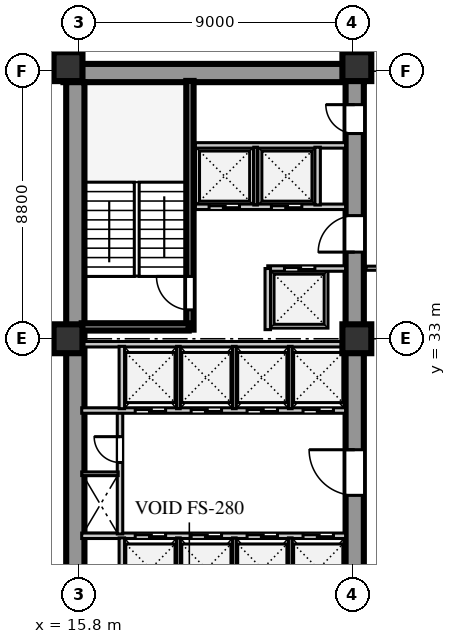
"""IFC4 building model, lengths in metres.
Left out: names, types, materials, properties, quantities, classifications, styles, units other than length and angle.
Written with IfcOpenShell. Run it as: python <this file> out.ifc"""

import sys

from ifc_helpers import new_model, si_unit, direction, frame, frame_2d, origin, origin_2d, place, context, subcontext, project, spatial, rectangle, extrude, element, fill, save


model = new_model("IFC4")
c1 = context("Model", 3, precision=1e-05, world=origin(), true_north=direction((0.0, 1.0)))
c2 = subcontext(c1, "Body", "Model", "MODEL_VIEW")
j1 = project(units=[si_unit("LENGTHUNIT", "METRE"), si_unit("PLANEANGLEUNIT", "RADIAN")], contexts=[c1])
p1 = place(None, origin())
s1 = spatial("IfcSite", under=j1, at=p1, CompositionType="ELEMENT")
p2 = place(p1, origin())
s2 = spatial("IfcBuilding", under=s1, at=p2, CompositionType="ELEMENT")
p3 = place(p2, frame((0.0, 0.0, 42.0)))
s3 = spatial("IfcBuildingStorey", under=s2, at=p3, CompositionType="ELEMENT", Elevation=42.0)
p4 = place(p3, frame((15.3, 41.74, 0.0), z_axis=(0.0, 0.0, 1.0), x_axis=(1.0, 0.0, 0.0)))
e1 = element("IfcWall", 1, at=p4, inside=s3, PredefinedType="SHEAR", context=c2, shape_type="SweptSolid", body=[
    extrude(rectangle(XDim=9.88, YDim=0.6, at=frame_2d((4.94, 0.0))), origin(), (0.0, 0.0, 1.0), 3.72),
])
p5 = place(p3, frame((15.69, 15.81, 0.0), z_axis=(0.0, 0.0, 1.0), x_axis=(0.0, 1.0, 0.0)))
e2 = element("IfcWall", 2, at=p5, inside=s3, PredefinedType="SHEAR", context=c2, shape_type="SweptSolid", body=[
    extrude(rectangle(XDim=25.63, YDim=0.6, at=frame_2d((12.815, 0.0))), origin(), (0.0, 0.0, 1.0), 3.72),
])
p6 = place(p3, frame((24.88, 15.74, 0.0), z_axis=(0.0, 0.0, 1.0), x_axis=(0.0, 1.0, 0.0)))
e3 = element("IfcWall", 3, at=p6, inside=s3, PredefinedType="SHEAR", context=c2, shape_type="SweptSolid", body=[
    extrude(rectangle(XDim=25.76, YDim=0.6, at=frame_2d((12.88, 0.0))), origin(), (0.0, 0.0, 1.0), 3.72),
])
p7 = place(p6, frame((1.61, 0.0, 0.0)))
e4 = element("IfcOpeningElement", 4, at=p7, cuts=e3, PredefinedType="OPENING", context=c2, shape_type="SweptSolid", body=[
    extrude(rectangle(XDim=1.2, YDim=2.1, at=frame_2d((0.6, 1.05))), frame((0.0, 0.31, 0.0), z_axis=(0.0, -1.0, 0.0), x_axis=(1.0, 0.0, 0.0)), (0.0, 0.0, 1.0), 0.62),
])
p8 = place(p6, frame((6.78, 0.0, 0.0)))
e5 = element("IfcOpeningElement", 5, at=p8, cuts=e3, PredefinedType="OPENING", context=c2, shape_type="SweptSolid", body=[
    extrude(rectangle(XDim=0.85, YDim=2.06, at=frame_2d((0.425, 1.03))), frame((0.0, 0.31, 0.0), z_axis=(0.0, -1.0, 0.0), x_axis=(1.0, 0.0, 0.0)), (0.0, 0.0, 1.0), 0.62),
])
p9 = place(p6, frame((12.11, 0.0, 0.0)))
e6 = element("IfcOpeningElement", 6, at=p9, cuts=e3, PredefinedType="OPENING", context=c2, shape_type="SweptSolid", body=[
    extrude(rectangle(XDim=1.5, YDim=2.12, at=frame_2d((0.75, 1.06))), frame((0.0, 0.31, 0.0), z_axis=(0.0, -1.0, 0.0), x_axis=(1.0, 0.0, 0.0)), (0.0, 0.0, 1.0), 0.62),
])
p10 = place(p6, frame((20.11, 0.0, 0.0)))
e7 = element("IfcOpeningElement", 7, at=p10, cuts=e3, PredefinedType="OPENING", context=c2, shape_type="SweptSolid", body=[
    extrude(rectangle(XDim=1.2, YDim=2.12, at=frame_2d((0.6, 1.06))), frame((0.0, 0.31, 0.0), z_axis=(0.0, -1.0, 0.0), x_axis=(1.0, 0.0, 0.0)), (0.0, 0.0, 1.0), 0.62),
])
p11 = place(p6, frame((24.01, 0.0, 0.0)))
e8 = element("IfcOpeningElement", 8, at=p11, cuts=e3, PredefinedType="OPENING", context=c2, shape_type="SweptSolid", body=[
    extrude(rectangle(XDim=0.95, YDim=2.1, at=frame_2d((0.475, 1.05))), frame((0.0, 0.31, 0.0), z_axis=(0.0, -1.0, 0.0), x_axis=(1.0, 0.0, 0.0)), (0.0, 0.0, 1.0), 0.62),
])
for number, where, z_axis, x_axis in (
    (9, (15.45, 33.0, 0.0), (0.0, 0.0, 1.0), (1.0, 0.0, 0.0)),
    (10, (15.45, 41.95, 0.0), (0.0, 0.0, 1.0), (1.0, 0.0, 0.0)),
    (11, (24.95, 33.0, 0.0), (0.0, 0.0, 1.0), (1.0, 0.0, 0.0)),
    (12, (24.95, 41.95, 0.0), (0.0, 0.0, 1.0), (1.0, 0.0, 0.0)),
):
    element("IfcColumn", number, at=place(p3, frame(where, z_axis=z_axis, x_axis=x_axis)), inside=s3, PredefinedType="COLUMN", context=c2, shape_type="SweptSolid", body=[
        extrude(rectangle(XDim=0.95, YDim=0.95, at=origin_2d()), origin(), (0.0, 0.0, 1.0), 3.72),
    ])
p12 = place(p3, frame((15.9, 26.52, 0.0), z_axis=(0.0, 0.0, 1.0), x_axis=(1.0, 0.0, 0.0)))
e13 = element("IfcWall", 13, at=p12, inside=s3, PredefinedType="SOLIDWALL", context=c2, shape_type="SweptSolid", body=[
    extrude(rectangle(XDim=8.68, YDim=0.18, at=frame_2d((4.34, 0.0))), origin(), (0.0, 0.0, 1.0), 3.72),
])
p13 = place(p12, frame((1.76, 0.0, 0.0)))
e14 = element("IfcOpeningElement", 14, at=p13, cuts=e13, PredefinedType="OPENING", context=c2, shape_type="SweptSolid", body=[
    extrude(rectangle(XDim=1.0, YDim=2.1, at=frame_2d((0.5, 1.05))), frame((0.0, 0.1, 0.0), z_axis=(0.0, -1.0, 0.0), x_axis=(1.0, 0.0, 0.0)), (0.0, 0.0, 1.0), 0.2),
])
p14 = place(p12, frame((3.6, 0.0, 0.0)))
e15 = element("IfcOpeningElement", 15, at=p14, cuts=e13, PredefinedType="OPENING", context=c2, shape_type="SweptSolid", body=[
    extrude(rectangle(XDim=1.0, YDim=2.1, at=frame_2d((0.5, 1.05))), frame((0.0, 0.1, 0.0), z_axis=(0.0, -1.0, 0.0), x_axis=(1.0, 0.0, 0.0)), (0.0, 0.0, 1.0), 0.2),
])
p15 = place(p12, frame((5.44, 0.0, 0.0)))
e16 = element("IfcOpeningElement", 16, at=p15, cuts=e13, PredefinedType="OPENING", context=c2, shape_type="SweptSolid", body=[
    extrude(rectangle(XDim=1.0, YDim=2.1, at=frame_2d((0.5, 1.05))), frame((0.0, 0.1, 0.0), z_axis=(0.0, -1.0, 0.0), x_axis=(1.0, 0.0, 0.0)), (0.0, 0.0, 1.0), 0.2),
])
p16 = place(p12, frame((7.28, 0.0, 0.0)))
e17 = element("IfcOpeningElement", 17, at=p16, cuts=e13, PredefinedType="OPENING", context=c2, shape_type="SweptSolid", body=[
    extrude(rectangle(XDim=1.0, YDim=2.1, at=frame_2d((0.5, 1.05))), frame((0.0, 0.1, 0.0), z_axis=(0.0, -1.0, 0.0), x_axis=(1.0, 0.0, 0.0)), (0.0, 0.0, 1.0), 0.2),
])
p17 = place(p3, frame((17.22, 24.4, 0.0), z_axis=(0.0, 0.0, 1.0), x_axis=(0.0, 1.0, 0.0)))
e18 = element("IfcWall", 18, at=p17, inside=s3, PredefinedType="SOLIDWALL", context=c2, shape_type="SweptSolid", body=[
    extrude(rectangle(XDim=2.05, YDim=0.18, at=frame_2d((1.025, 0.0))), origin(), (0.0, 0.0, 1.0), 3.72),
])
for number, where, z_axis, x_axis in (
    (19, (19.08, 24.4, 0.0), (0.0, 0.0, 1.0), (0.0, 1.0, 0.0)),
    (20, (20.92, 24.4, 0.0), (0.0, 0.0, 1.0), (0.0, 1.0, 0.0)),
    (21, (22.76, 24.4, 0.0), (0.0, 0.0, 1.0), (0.0, 1.0, 0.0)),
):
    element("IfcWall", number, at=place(p3, frame(where, z_axis=z_axis, x_axis=x_axis)), inside=s3, PredefinedType="PARTITIONING", context=c2, shape_type="SweptSolid", body=[
        extrude(rectangle(XDim=2.05, YDim=0.12, at=frame_2d((1.025, 0.0))), origin(), (0.0, 0.0, 1.0), 3.72),
    ])
p18 = place(p3, frame((17.16, 26.58, 0.0), z_axis=(0.0, 0.0, 1.0), x_axis=(0.0, 1.0, 0.0)))
e22 = element("IfcWall", 22, at=p18, inside=s3, PredefinedType="SOLIDWALL", context=c2, shape_type="SweptSolid", body=[
    extrude(rectangle(XDim=4.02, YDim=0.18, at=frame_2d((2.01, 0.0))), origin(), (0.0, 0.0, 1.0), 3.72),
])
p19 = place(p18, frame((2.35, 0.0, 0.0)))
e23 = element("IfcOpeningElement", 23, at=p19, cuts=e22, PredefinedType="OPENING", context=c2, shape_type="SweptSolid", body=[
    extrude(rectangle(XDim=0.85, YDim=2.06, at=frame_2d((0.425, 1.03))), frame((0.0, 0.1, 0.0), z_axis=(0.0, -1.0, 0.0), x_axis=(1.0, 0.0, 0.0)), (0.0, 0.0, 1.0), 0.2),
])
p20 = place(p3, frame((15.9, 28.56, 0.0), z_axis=(0.0, 0.0, 1.0), x_axis=(1.0, 0.0, 0.0)))
e24 = element("IfcWall", 24, at=p20, inside=s3, PredefinedType="PARTITIONING", context=c2, shape_type="SweptSolid", body=[
    extrude(rectangle(XDim=1.2, YDim=0.12, at=frame_2d((0.6, 0.0))), origin(), (0.0, 0.0, 1.0), 3.72),
])
p21 = place(p3, frame((15.9, 30.64, 0.0), z_axis=(0.0, 0.0, 1.0), x_axis=(1.0, 0.0, 0.0)))
e25 = element("IfcWall", 25, at=p21, inside=s3, PredefinedType="SOLIDWALL", context=c2, shape_type="SweptSolid", body=[
    extrude(rectangle(XDim=8.68, YDim=0.18, at=frame_2d((4.34, 0.0))), origin(), (0.0, 0.0, 1.0), 3.72),
])
p22 = place(p21, frame((1.76, 0.0, 0.0)))
e26 = element("IfcOpeningElement", 26, at=p22, cuts=e25, PredefinedType="OPENING", context=c2, shape_type="SweptSolid", body=[
    extrude(rectangle(XDim=1.0, YDim=2.1, at=frame_2d((0.5, 1.05))), frame((0.0, 0.1, 0.0), z_axis=(0.0, -1.0, 0.0), x_axis=(1.0, 0.0, 0.0)), (0.0, 0.0, 1.0), 0.2),
])
p23 = place(p21, frame((3.6, 0.0, 0.0)))
e27 = element("IfcOpeningElement", 27, at=p23, cuts=e25, PredefinedType="OPENING", context=c2, shape_type="SweptSolid", body=[
    extrude(rectangle(XDim=1.0, YDim=2.1, at=frame_2d((0.5, 1.05))), frame((0.0, 0.1, 0.0), z_axis=(0.0, -1.0, 0.0), x_axis=(1.0, 0.0, 0.0)), (0.0, 0.0, 1.0), 0.2),
])
p24 = place(p21, frame((5.44, 0.0, 0.0)))
e28 = element("IfcOpeningElement", 28, at=p24, cuts=e25, PredefinedType="OPENING", context=c2, shape_type="SweptSolid", body=[
    extrude(rectangle(XDim=1.0, YDim=2.1, at=frame_2d((0.5, 1.05))), frame((0.0, 0.1, 0.0), z_axis=(0.0, -1.0, 0.0), x_axis=(1.0, 0.0, 0.0)), (0.0, 0.0, 1.0), 0.2),
])
p25 = place(p21, frame((7.28, 0.0, 0.0)))
e29 = element("IfcOpeningElement", 29, at=p25, cuts=e25, PredefinedType="OPENING", context=c2, shape_type="SweptSolid", body=[
    extrude(rectangle(XDim=1.0, YDim=2.1, at=frame_2d((0.5, 1.05))), frame((0.0, 0.1, 0.0), z_axis=(0.0, -1.0, 0.0), x_axis=(1.0, 0.0, 0.0)), (0.0, 0.0, 1.0), 0.2),
])
p26 = place(p3, frame((15.9, 32.82, 0.0), z_axis=(0.0, 0.0, 1.0), x_axis=(1.0, 0.0, 0.0)))
e30 = element("IfcWall", 30, at=p26, inside=s3, PredefinedType="SOLIDWALL", context=c2, shape_type="SweptSolid", body=[
    extrude(rectangle(XDim=8.68, YDim=0.18, at=frame_2d((4.34, 0.0))), origin(), (0.0, 0.0, 1.0), 3.02),
])
p27 = place(p3, frame((17.22, 30.7, 0.0), z_axis=(0.0, 0.0, 1.0), x_axis=(0.0, 1.0, 0.0)))
e31 = element("IfcWall", 31, at=p27, inside=s3, PredefinedType="SOLIDWALL", context=c2, shape_type="SweptSolid", body=[
    extrude(rectangle(XDim=2.05, YDim=0.18, at=frame_2d((1.025, 0.0))), origin(), (0.0, 0.0, 1.0), 3.72),
])
for number, where, z_axis, x_axis in (
    (32, (19.08, 30.7, 0.0), (0.0, 0.0, 1.0), (0.0, 1.0, 0.0)),
    (33, (20.92, 30.7, 0.0), (0.0, 0.0, 1.0), (0.0, 1.0, 0.0)),
    (34, (22.76, 30.7, 0.0), (0.0, 0.0, 1.0), (0.0, 1.0, 0.0)),
):
    element("IfcWall", number, at=place(p3, frame(where, z_axis=z_axis, x_axis=x_axis)), inside=s3, PredefinedType="PARTITIONING", context=c2, shape_type="SweptSolid", body=[
        extrude(rectangle(XDim=2.05, YDim=0.12, at=frame_2d((1.025, 0.0))), origin(), (0.0, 0.0, 1.0), 3.72),
    ])
p28 = place(p3, frame((19.46, 33.3, 0.0), z_axis=(0.0, 0.0, 1.0), x_axis=(0.0, 1.0, 0.0)))
e35 = element("IfcWall", 35, at=p28, inside=s3, PredefinedType="SHEAR", context=c2, shape_type="SweptSolid", body=[
    extrude(rectangle(XDim=8.18, YDim=0.24, at=frame_2d((4.09, 0.0))), origin(), (0.0, 0.0, 1.0), 4.0),
])
p29 = place(p28, frame((0.65, 0.0, 0.0)))
e36 = element("IfcOpeningElement", 36, at=p29, cuts=e35, PredefinedType="OPENING", context=c2, shape_type="SweptSolid", body=[
    extrude(rectangle(XDim=1.1, YDim=2.1, at=frame_2d((0.55, 1.05))), frame((0.0, 0.13, 0.0), z_axis=(0.0, -1.0, 0.0), x_axis=(1.0, 0.0, 0.0)), (0.0, 0.0, 1.0), 0.26),
])
p30 = place(p3, frame((15.9, 33.39, 0.0), z_axis=(0.0, 0.0, 1.0), x_axis=(1.0, 0.0, 0.0)))
e37 = element("IfcWall", 37, at=p30, inside=s3, PredefinedType="SHEAR", context=c2, shape_type="SweptSolid", body=[
    extrude(rectangle(XDim=3.52, YDim=0.24, at=frame_2d((1.76, 0.0))), origin(), (0.0, 0.0, 1.0), 4.0),
])
p31 = place(p3, frame((22.02, 35.31, 0.0), z_axis=(0.0, 0.0, 1.0), x_axis=(1.0, 0.0, 0.0)))
e38 = element("IfcWall", 38, at=p31, inside=s3, PredefinedType="SOLIDWALL", context=c2, shape_type="SweptSolid", body=[
    extrude(rectangle(XDim=2.56, YDim=0.18, at=frame_2d((1.28, 0.0))), origin(), (0.0, 0.0, 1.0), 3.72),
])
p32 = place(p31, frame((0.55, 0.0, 0.0)))
e39 = element("IfcOpeningElement", 39, at=p32, cuts=e38, PredefinedType="OPENING", context=c2, shape_type="SweptSolid", body=[
    extrude(rectangle(XDim=1.0, YDim=2.1, at=frame_2d((0.5, 1.05))), frame((0.0, 0.1, 0.0), z_axis=(0.0, -1.0, 0.0), x_axis=(1.0, 0.0, 0.0)), (0.0, 0.0, 1.0), 0.2),
])
p33 = place(p3, frame((22.02, 33.3, 0.0), z_axis=(0.0, 0.0, 1.0), x_axis=(0.0, 1.0, 0.0)))
e40 = element("IfcWall", 40, at=p33, inside=s3, PredefinedType="SOLIDWALL", context=c2, shape_type="SweptSolid", body=[
    extrude(rectangle(XDim=2.01, YDim=0.18, at=frame_2d((1.005, 0.0))), origin(), (0.0, 0.0, 1.0), 3.72),
])
p34 = place(p3, frame((19.64, 37.34, 0.0), z_axis=(0.0, 0.0, 1.0), x_axis=(1.0, 0.0, 0.0)))
e41 = element("IfcWall", 41, at=p34, inside=s3, PredefinedType="SOLIDWALL", context=c2, shape_type="SweptSolid", body=[
    extrude(rectangle(XDim=4.94, YDim=0.18, at=frame_2d((2.47, 0.0))), origin(), (0.0, 0.0, 1.0), 3.72),
])
p35 = place(p34, frame((0.45, 0.0, 0.0)))
e42 = element("IfcOpeningElement", 42, at=p35, cuts=e41, PredefinedType="OPENING", context=c2, shape_type="SweptSolid", body=[
    extrude(rectangle(XDim=1.0, YDim=2.1, at=frame_2d((0.5, 1.05))), frame((0.0, 0.1, 0.0), z_axis=(0.0, -1.0, 0.0), x_axis=(1.0, 0.0, 0.0)), (0.0, 0.0, 1.0), 0.2),
])
p36 = place(p34, frame((2.5, 0.0, 0.0)))
e43 = element("IfcOpeningElement", 43, at=p36, cuts=e41, PredefinedType="OPENING", context=c2, shape_type="SweptSolid", body=[
    extrude(rectangle(XDim=1.0, YDim=2.1, at=frame_2d((0.5, 1.05))), frame((0.0, 0.1, 0.0), z_axis=(0.0, -1.0, 0.0), x_axis=(1.0, 0.0, 0.0)), (0.0, 0.0, 1.0), 0.2),
])
p37 = place(p3, frame((19.64, 39.36, 0.0), z_axis=(0.0, 0.0, 1.0), x_axis=(1.0, 0.0, 0.0)))
e44 = element("IfcWall", 44, at=p37, inside=s3, PredefinedType="SOLIDWALL", context=c2, shape_type="SweptSolid", body=[
    extrude(rectangle(XDim=4.94, YDim=0.18, at=frame_2d((2.47, 0.0))), origin(), (0.0, 0.0, 1.0), 3.72),
])
p38 = place(p3, frame((21.62, 37.4, 0.0), z_axis=(0.0, 0.0, 1.0), x_axis=(0.0, 1.0, 0.0)))
e45 = element("IfcWall", 45, at=p38, inside=s3, PredefinedType="PARTITIONING", context=c2, shape_type="SweptSolid", body=[
    extrude(rectangle(XDim=1.9, YDim=0.12, at=frame_2d((0.95, 0.0))), origin(), (0.0, 0.0, 1.0), 3.72),
])
p39 = place(p3, frame((23.66, 37.4, 0.0), z_axis=(0.0, 0.0, 1.0), x_axis=(0.0, 1.0, 0.0)))
e46 = element("IfcWall", 46, at=p39, inside=s3, PredefinedType="SOLIDWALL", context=c2, shape_type="SweptSolid", body=[
    extrude(rectangle(XDim=1.9, YDim=0.18, at=frame_2d((0.95, 0.0))), origin(), (0.0, 0.0, 1.0), 3.72),
])
p40 = place(p3, frame((25.25, 35.32, 0.0), z_axis=(0.0, 0.0, 1.0), x_axis=(1.0, 0.0, 0.0)))
e47 = element("IfcWall", 47, at=p40, inside=s3, PredefinedType="PARTITIONING", context=c2, shape_type="SweptSolid", body=[
    extrude(rectangle(XDim=9.47, YDim=0.135, at=frame_2d((4.735, 0.0))), origin(), (0.0, 0.0, 1.0), 3.72),
])
p41 = place(p40, frame((1.875, 0.0, 0.0)))
e48 = element("IfcOpeningElement", 48, at=p41, cuts=e47, PredefinedType="OPENING", context=c2, shape_type="SweptSolid", body=[
    extrude(rectangle(XDim=0.95, YDim=2.08, at=frame_2d((0.475, 1.04))), frame((0.0, 0.078, 0.0), z_axis=(0.0, -1.0, 0.0), x_axis=(1.0, 0.0, 0.0)), (0.0, 0.0, 1.0), 0.155),
])
p42 = place(p40, frame((6.565, 0.0, 0.0)))
e49 = element("IfcOpeningElement", 49, at=p42, cuts=e47, PredefinedType="OPENING", context=c2, shape_type="SweptSolid", body=[
    extrude(rectangle(XDim=0.95, YDim=2.08, at=frame_2d((0.475, 1.04))), frame((0.0, 0.078, 0.0), z_axis=(0.0, -1.0, 0.0), x_axis=(1.0, 0.0, 0.0)), (0.0, 0.0, 1.0), 0.155),
])
p43 = place(p13, origin())
e50 = element("IfcDoor", 50, at=p43, inside=s3, OperationType="DOUBLE_DOOR_SLIDING", PredefinedType="DOOR", context=c2, shape_type="SweptSolid", body=[
    extrude(rectangle(XDim=1.0, YDim=2.1, at=frame_2d((0.5, 1.05))), frame((0.0, 0.025, 0.0), z_axis=(0.0, -1.0, 0.0), x_axis=(1.0, 0.0, 0.0)), (0.0, 0.0, 1.0), 0.05),
])
fill(e14, e50)
p44 = place(p14, origin())
e51 = element("IfcDoor", 51, at=p44, inside=s3, OperationType="DOUBLE_DOOR_SLIDING", PredefinedType="DOOR", context=c2, shape_type="SweptSolid", body=[
    extrude(rectangle(XDim=1.0, YDim=2.1, at=frame_2d((0.5, 1.05))), frame((0.0, 0.025, 0.0), z_axis=(0.0, -1.0, 0.0), x_axis=(1.0, 0.0, 0.0)), (0.0, 0.0, 1.0), 0.05),
])
fill(e15, e51)
p45 = place(p15, origin())
e52 = element("IfcDoor", 52, at=p45, inside=s3, OperationType="DOUBLE_DOOR_SLIDING", PredefinedType="DOOR", context=c2, shape_type="SweptSolid", body=[
    extrude(rectangle(XDim=1.0, YDim=2.1, at=frame_2d((0.5, 1.05))), frame((0.0, 0.025, 0.0), z_axis=(0.0, -1.0, 0.0), x_axis=(1.0, 0.0, 0.0)), (0.0, 0.0, 1.0), 0.05),
])
fill(e16, e52)
p46 = place(p16, origin())
e53 = element("IfcDoor", 53, at=p46, inside=s3, OperationType="DOUBLE_DOOR_SLIDING", PredefinedType="DOOR", context=c2, shape_type="SweptSolid", body=[
    extrude(rectangle(XDim=1.0, YDim=2.1, at=frame_2d((0.5, 1.05))), frame((0.0, 0.025, 0.0), z_axis=(0.0, -1.0, 0.0), x_axis=(1.0, 0.0, 0.0)), (0.0, 0.0, 1.0), 0.05),
])
fill(e17, e53)
p47 = place(p19, origin())
e54 = element("IfcDoor", 54, at=p47, inside=s3, OperationType="SINGLE_SWING_RIGHT", PredefinedType="DOOR", context=c2, shape_type="SweptSolid", body=[
    extrude(rectangle(XDim=0.85, YDim=2.06, at=frame_2d((0.425, 1.03))), frame((0.0, 0.025, 0.0), z_axis=(0.0, -1.0, 0.0), x_axis=(1.0, 0.0, 0.0)), (0.0, 0.0, 1.0), 0.05),
])
fill(e23, e54)
p48 = place(p9, frame((1.5, 0.0, 0.0), z_axis=(0.0, 0.0, 1.0), x_axis=(-1.0, 0.0, 0.0)))
e55 = element("IfcDoor", 55, at=p48, inside=s3, OperationType="SINGLE_SWING_LEFT", PredefinedType="DOOR", context=c2, shape_type="SweptSolid", body=[
    extrude(rectangle(XDim=1.5, YDim=2.12, at=frame_2d((0.75, 1.06))), frame((0.0, 0.025, 0.0), z_axis=(0.0, -1.0, 0.0), x_axis=(1.0, 0.0, 0.0)), (0.0, 0.0, 1.0), 0.05),
])
fill(e6, e55)
p49 = place(p22, frame((1.0, 0.0, 0.0), z_axis=(0.0, 0.0, 1.0), x_axis=(-1.0, 0.0, 0.0)))
e56 = element("IfcDoor", 56, at=p49, inside=s3, OperationType="DOUBLE_DOOR_SLIDING", PredefinedType="DOOR", context=c2, shape_type="SweptSolid", body=[
    extrude(rectangle(XDim=1.0, YDim=2.1, at=frame_2d((0.5, 1.05))), frame((0.0, 0.025, 0.0), z_axis=(0.0, -1.0, 0.0), x_axis=(1.0, 0.0, 0.0)), (0.0, 0.0, 1.0), 0.05),
])
fill(e26, e56)
p50 = place(p23, frame((1.0, 0.0, 0.0), z_axis=(0.0, 0.0, 1.0), x_axis=(-1.0, 0.0, 0.0)))
e57 = element("IfcDoor", 57, at=p50, inside=s3, OperationType="DOUBLE_DOOR_SLIDING", PredefinedType="DOOR", context=c2, shape_type="SweptSolid", body=[
    extrude(rectangle(XDim=1.0, YDim=2.1, at=frame_2d((0.5, 1.05))), frame((0.0, 0.025, 0.0), z_axis=(0.0, -1.0, 0.0), x_axis=(1.0, 0.0, 0.0)), (0.0, 0.0, 1.0), 0.05),
])
fill(e27, e57)
p51 = place(p24, frame((1.0, 0.0, 0.0), z_axis=(0.0, 0.0, 1.0), x_axis=(-1.0, 0.0, 0.0)))
e58 = element("IfcDoor", 58, at=p51, inside=s3, OperationType="DOUBLE_DOOR_SLIDING", PredefinedType="DOOR", context=c2, shape_type="SweptSolid", body=[
    extrude(rectangle(XDim=1.0, YDim=2.1, at=frame_2d((0.5, 1.05))), frame((0.0, 0.025, 0.0), z_axis=(0.0, -1.0, 0.0), x_axis=(1.0, 0.0, 0.0)), (0.0, 0.0, 1.0), 0.05),
])
fill(e28, e58)
p52 = place(p25, frame((1.0, 0.0, 0.0), z_axis=(0.0, 0.0, 1.0), x_axis=(-1.0, 0.0, 0.0)))
e59 = element("IfcDoor", 59, at=p52, inside=s3, OperationType="DOUBLE_DOOR_SLIDING", PredefinedType="DOOR", context=c2, shape_type="SweptSolid", body=[
    extrude(rectangle(XDim=1.0, YDim=2.1, at=frame_2d((0.5, 1.05))), frame((0.0, 0.025, 0.0), z_axis=(0.0, -1.0, 0.0), x_axis=(1.0, 0.0, 0.0)), (0.0, 0.0, 1.0), 0.05),
])
fill(e29, e59)
p53 = place(p29, origin())
e60 = element("IfcDoor", 60, at=p53, inside=s3, OperationType="SINGLE_SWING_RIGHT", PredefinedType="DOOR", context=c2, shape_type="SweptSolid", body=[
    extrude(rectangle(XDim=1.1, YDim=2.1, at=frame_2d((0.55, 1.05))), frame((0.0, 0.025, 0.0), z_axis=(0.0, -1.0, 0.0), x_axis=(1.0, 0.0, 0.0)), (0.0, 0.0, 1.0), 0.05),
])
fill(e36, e60)
p54 = place(p10, frame((1.2, 0.0, 0.0), z_axis=(0.0, 0.0, 1.0), x_axis=(-1.0, 0.0, 0.0)))
e61 = element("IfcDoor", 61, at=p54, inside=s3, OperationType="SINGLE_SWING_RIGHT", PredefinedType="DOOR", context=c2, shape_type="SweptSolid", body=[
    extrude(rectangle(XDim=1.2, YDim=2.12, at=frame_2d((0.6, 1.06))), frame((0.0, 0.025, 0.0), z_axis=(0.0, -1.0, 0.0), x_axis=(1.0, 0.0, 0.0)), (0.0, 0.0, 1.0), 0.05),
])
fill(e7, e61)
p55 = place(p35, frame((1.0, 0.0, 0.0), z_axis=(0.0, 0.0, 1.0), x_axis=(-1.0, 0.0, 0.0)))
e62 = element("IfcDoor", 62, at=p55, inside=s3, OperationType="DOUBLE_DOOR_SLIDING", PredefinedType="DOOR", context=c2, shape_type="SweptSolid", body=[
    extrude(rectangle(XDim=1.0, YDim=2.1, at=frame_2d((0.5, 1.05))), frame((0.0, 0.025, 0.0), z_axis=(0.0, -1.0, 0.0), x_axis=(1.0, 0.0, 0.0)), (0.0, 0.0, 1.0), 0.05),
])
fill(e42, e62)
p56 = place(p36, frame((1.0, 0.0, 0.0), z_axis=(0.0, 0.0, 1.0), x_axis=(-1.0, 0.0, 0.0)))
e63 = element("IfcDoor", 63, at=p56, inside=s3, OperationType="DOUBLE_DOOR_SLIDING", PredefinedType="DOOR", context=c2, shape_type="SweptSolid", body=[
    extrude(rectangle(XDim=1.0, YDim=2.1, at=frame_2d((0.5, 1.05))), frame((0.0, 0.025, 0.0), z_axis=(0.0, -1.0, 0.0), x_axis=(1.0, 0.0, 0.0)), (0.0, 0.0, 1.0), 0.05),
])
fill(e43, e63)
p57 = place(p32, origin())
e64 = element("IfcDoor", 64, at=p57, inside=s3, OperationType="DOUBLE_DOOR_SLIDING", PredefinedType="DOOR", context=c2, shape_type="SweptSolid", body=[
    extrude(rectangle(XDim=1.0, YDim=2.1, at=frame_2d((0.5, 1.05))), frame((0.0, 0.025, 0.0), z_axis=(0.0, -1.0, 0.0), x_axis=(1.0, 0.0, 0.0)), (0.0, 0.0, 1.0), 0.05),
])
fill(e39, e64)
p58 = place(p11, frame((0.95, 0.0, 0.0), z_axis=(0.0, 0.0, 1.0), x_axis=(-1.0, 0.0, 0.0)))
e65 = element("IfcDoor", 65, at=p58, inside=s3, OperationType="SINGLE_SWING_LEFT", PredefinedType="DOOR", context=c2, shape_type="SweptSolid", body=[
    extrude(rectangle(XDim=0.95, YDim=2.1, at=frame_2d((0.475, 1.05))), frame((0.0, 0.025, 0.0), z_axis=(0.0, -1.0, 0.0), x_axis=(1.0, 0.0, 0.0)), (0.0, 0.0, 1.0), 0.05),
])
fill(e8, e65)
save(model, sys.argv[1])
